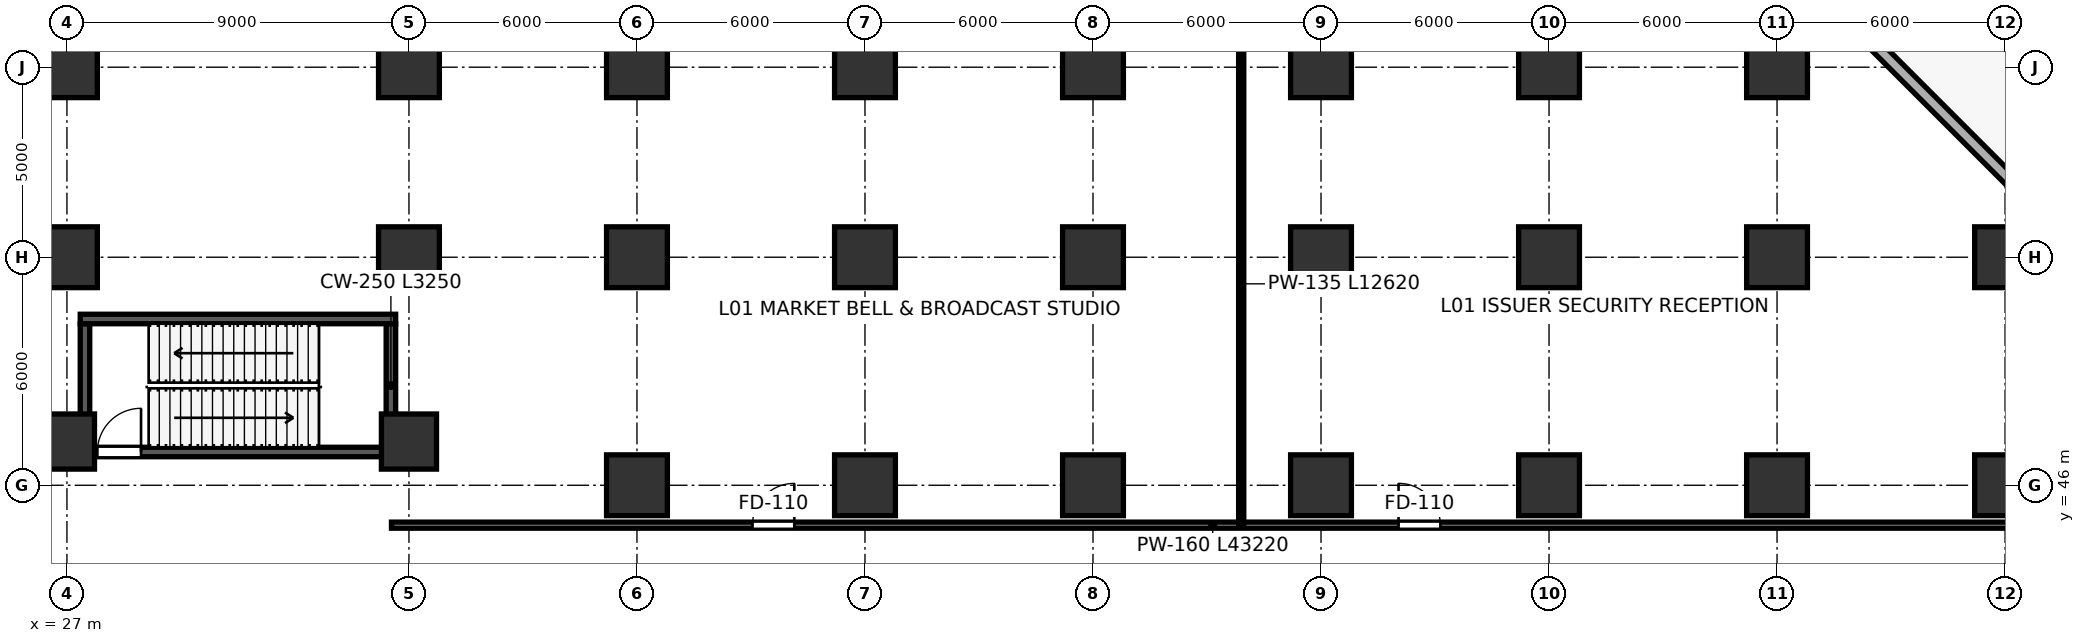
"""IFC4 building model, lengths in metres.
Left out: names, types, materials, properties, quantities, classifications, styles, units other than length and angle.
Written with IfcOpenShell. Run it as: python <this file> out.ifc"""

import sys

from ifc_helpers import new_model, si_unit, direction, frame, frame_2d, origin, origin_2d, place, context, subcontext, project, spatial, rectangle, extrude, source, transform, mapped, element, fill, save


model = new_model("IFC4")
c1 = context("Model", 3, precision=1e-05, world=origin(), true_north=direction((0.0, 1.0)))
c2 = subcontext(c1, "Body", "Model", "MODEL_VIEW")
j1 = project(units=[si_unit("LENGTHUNIT", "METRE"), si_unit("PLANEANGLEUNIT", "RADIAN")], contexts=[c1])
p1 = place(None, origin())
s1 = spatial("IfcSite", under=j1, at=p1, CompositionType="ELEMENT")
p2 = place(p1, origin())
s2 = spatial("IfcBuilding", under=s1, at=p2, CompositionType="ELEMENT")
p3 = place(p2, origin())
s3 = spatial("IfcBuildingStorey", under=s2, at=p3, CompositionType="ELEMENT", Elevation=0.0)
m1 = source(origin(), c2, "Body", "SweptSolid", [
    extrude(rectangle(XDim=1.6, YDim=1.6, at=origin_2d()), origin(), (0.0, 0.0, 1.0), 5.999),
])
p4 = place(p3, frame((27.0, 52.0, 0.001), z_axis=(0.0, 0.0, 1.0), x_axis=(1.0, 0.0, 0.0)))
e1 = element("IfcColumn", 1, at=p4, inside=s3, PredefinedType="COLUMN", context=c2, shape_type="MappedRepresentation", body=[
    mapped(m1, transform((0.0, 0.0, 0.0), scale=1.0)),
])
m2 = source(origin(), c2, "Body", "SweptSolid", [
    extrude(rectangle(XDim=1.6, YDim=1.6, at=origin_2d()), origin(), (0.0, 0.0, 1.0), 5.999),
])
p5 = place(p3, frame((27.0, 57.0, 0.001), z_axis=(0.0, 0.0, 1.0), x_axis=(1.0, 0.0, 0.0)))
e2 = element("IfcColumn", 2, at=p5, inside=s3, PredefinedType="COLUMN", context=c2, shape_type="MappedRepresentation", body=[
    mapped(m2, transform((0.0, 0.0, 0.0), scale=1.0)),
])
m3 = source(origin(), c2, "Body", "SweptSolid", [
    extrude(rectangle(XDim=1.45, YDim=1.45, at=origin_2d()), origin(), (0.0, 0.0, 1.0), 5.999),
])
p6 = place(p3, frame((27.0, 47.15, 0.001), z_axis=(0.0, 0.0, 1.0), x_axis=(1.0, 0.0, 0.0)))
e3 = element("IfcColumn", 3, at=p6, inside=s3, PredefinedType="COLUMN", context=c2, shape_type="MappedRepresentation", body=[
    mapped(m3, transform((0.0, 0.0, 0.0), scale=1.0)),
])
p7 = place(p3, frame((36.0, 52.0, 0.001), z_axis=(0.0, 0.0, 1.0), x_axis=(1.0, 0.0, 0.0)))
e4 = element("IfcColumn", 4, at=p7, inside=s3, PredefinedType="COLUMN", context=c2, shape_type="MappedRepresentation", body=[
    mapped(m1, transform((0.0, 0.0, 0.0), scale=1.0)),
])
p8 = place(p3, frame((36.0, 57.0, 0.001), z_axis=(0.0, 0.0, 1.0), x_axis=(1.0, 0.0, 0.0)))
e5 = element("IfcColumn", 5, at=p8, inside=s3, PredefinedType="COLUMN", context=c2, shape_type="MappedRepresentation", body=[
    mapped(m2, transform((0.0, 0.0, 0.0), scale=1.0)),
])
p9 = place(p3, frame((36.0, 47.15, 0.001), z_axis=(0.0, 0.0, 1.0), x_axis=(1.0, 0.0, 0.0)))
e6 = element("IfcColumn", 6, at=p9, inside=s3, PredefinedType="COLUMN", context=c2, shape_type="MappedRepresentation", body=[
    mapped(m3, transform((0.0, 0.0, 0.0), scale=1.0)),
])
for number, where, z_axis, x_axis in (
    (7, (42.0, 46.0, 0.001), (0.0, 0.0, 1.0), (1.0, 0.0, 0.0)),
    (8, (42.0, 52.0, 0.001), (0.0, 0.0, 1.0), (1.0, 0.0, 0.0)),
):
    element("IfcColumn", number, at=place(p3, frame(where, z_axis=z_axis, x_axis=x_axis)), inside=s3, PredefinedType="COLUMN", context=c2, shape_type="MappedRepresentation", body=[
        mapped(m1, transform((0.0, 0.0, 0.0), scale=1.0)),
    ])
p10 = place(p3, frame((42.0, 57.0, 0.001), z_axis=(0.0, 0.0, 1.0), x_axis=(1.0, 0.0, 0.0)))
e9 = element("IfcColumn", 9, at=p10, inside=s3, PredefinedType="COLUMN", context=c2, shape_type="MappedRepresentation", body=[
    mapped(m2, transform((0.0, 0.0, 0.0), scale=1.0)),
])
for number, where, z_axis, x_axis in (
    (10, (48.0, 46.0, 0.001), (0.0, 0.0, 1.0), (1.0, 0.0, 0.0)),
    (11, (48.0, 52.0, 0.001), (0.0, 0.0, 1.0), (1.0, 0.0, 0.0)),
):
    element("IfcColumn", number, at=place(p3, frame(where, z_axis=z_axis, x_axis=x_axis)), inside=s3, PredefinedType="COLUMN", context=c2, shape_type="MappedRepresentation", body=[
        mapped(m1, transform((0.0, 0.0, 0.0), scale=1.0)),
    ])
p11 = place(p3, frame((48.0, 57.0, 0.001), z_axis=(0.0, 0.0, 1.0), x_axis=(1.0, 0.0, 0.0)))
e12 = element("IfcColumn", 12, at=p11, inside=s3, PredefinedType="COLUMN", context=c2, shape_type="MappedRepresentation", body=[
    mapped(m2, transform((0.0, 0.0, 0.0), scale=1.0)),
])
for number, where, z_axis, x_axis in (
    (13, (54.0, 46.0, 0.001), (0.0, 0.0, 1.0), (1.0, 0.0, 0.0)),
    (14, (54.0, 52.0, 0.001), (0.0, 0.0, 1.0), (1.0, 0.0, 0.0)),
):
    element("IfcColumn", number, at=place(p3, frame(where, z_axis=z_axis, x_axis=x_axis)), inside=s3, PredefinedType="COLUMN", context=c2, shape_type="MappedRepresentation", body=[
        mapped(m1, transform((0.0, 0.0, 0.0), scale=1.0)),
    ])
p12 = place(p3, frame((54.0, 57.0, 0.001), z_axis=(0.0, 0.0, 1.0), x_axis=(1.0, 0.0, 0.0)))
e15 = element("IfcColumn", 15, at=p12, inside=s3, PredefinedType="COLUMN", context=c2, shape_type="MappedRepresentation", body=[
    mapped(m2, transform((0.0, 0.0, 0.0), scale=1.0)),
])
for number, where, z_axis, x_axis in (
    (16, (60.0, 46.0, 0.001), (0.0, 0.0, 1.0), (1.0, 0.0, 0.0)),
    (17, (60.0, 52.0, 0.001), (0.0, 0.0, 1.0), (1.0, 0.0, 0.0)),
):
    element("IfcColumn", number, at=place(p3, frame(where, z_axis=z_axis, x_axis=x_axis)), inside=s3, PredefinedType="COLUMN", context=c2, shape_type="MappedRepresentation", body=[
        mapped(m1, transform((0.0, 0.0, 0.0), scale=1.0)),
    ])
p13 = place(p3, frame((60.0, 57.0, 0.001), z_axis=(0.0, 0.0, 1.0), x_axis=(1.0, 0.0, 0.0)))
e18 = element("IfcColumn", 18, at=p13, inside=s3, PredefinedType="COLUMN", context=c2, shape_type="MappedRepresentation", body=[
    mapped(m2, transform((0.0, 0.0, 0.0), scale=1.0)),
])
for number, where, z_axis, x_axis in (
    (19, (66.0, 46.0, 0.001), (0.0, 0.0, 1.0), (1.0, 0.0, 0.0)),
    (20, (66.0, 52.0, 0.001), (0.0, 0.0, 1.0), (1.0, 0.0, 0.0)),
):
    element("IfcColumn", number, at=place(p3, frame(where, z_axis=z_axis, x_axis=x_axis)), inside=s3, PredefinedType="COLUMN", context=c2, shape_type="MappedRepresentation", body=[
        mapped(m1, transform((0.0, 0.0, 0.0), scale=1.0)),
    ])
p14 = place(p3, frame((66.0, 57.0, 0.001), z_axis=(0.0, 0.0, 1.0), x_axis=(1.0, 0.0, 0.0)))
e21 = element("IfcColumn", 21, at=p14, inside=s3, PredefinedType="COLUMN", context=c2, shape_type="MappedRepresentation", body=[
    mapped(m2, transform((0.0, 0.0, 0.0), scale=1.0)),
])
for number, where, z_axis, x_axis in (
    (22, (72.0, 46.0, 0.001), (0.0, 0.0, 1.0), (1.0, 0.0, 0.0)),
    (23, (72.0, 52.0, 0.001), (0.0, 0.0, 1.0), (1.0, 0.0, 0.0)),
):
    element("IfcColumn", number, at=place(p3, frame(where, z_axis=z_axis, x_axis=x_axis)), inside=s3, PredefinedType="COLUMN", context=c2, shape_type="MappedRepresentation", body=[
        mapped(m1, transform((0.0, 0.0, 0.0), scale=1.0)),
    ])
for number, where, z_axis, x_axis in (
    (24, (72.0, 57.0, 0.001), (0.0, 0.0, 1.0), (1.0, 0.0, 0.0)),
    (25, (78.0, 46.0, 0.001), (0.0, 0.0, 1.0), (1.0, 0.0, 0.0)),
    (26, (78.0, 52.0, 0.001), (0.0, 0.0, 1.0), (1.0, 0.0, 0.0)),
):
    element("IfcColumn", number, at=place(p3, frame(where, z_axis=z_axis, x_axis=x_axis)), inside=s3, PredefinedType="COLUMN", context=c2, shape_type="MappedRepresentation", body=[
        mapped(m2, transform((0.0, 0.0, 0.0), scale=1.0)),
    ])
p15 = place(p3, frame((78.829, 53.329, 0.0), z_axis=(0.0, 0.0, 1.0), x_axis=(-0.707106781187, 0.707106781187, 0.0)))
e27 = element("IfcWall", 27, at=p15, inside=s3, PredefinedType="SOLIDWALL", context=c2, shape_type="SweptSolid", body=[
    extrude(rectangle(XDim=6.364, YDim=0.32, at=frame_2d((3.182, 0.0))), origin(), (0.0, 0.0, 1.0), 5.74),
])
for number, where, z_axis, x_axis in (
    (28, (27.475, 47.0, 0.0), (0.0, 0.0, 1.0), (0.0, 1.0, 0.0)),
    (29, (35.525, 47.0, 0.0), (0.0, 0.0, 1.0), (0.0, 1.0, 0.0)),
):
    element("IfcWall", number, at=place(p3, frame(where, z_axis=z_axis, x_axis=x_axis)), inside=s3, PredefinedType="SHEAR", context=c2, shape_type="SweptSolid", body=[
        extrude(rectangle(XDim=3.25, YDim=0.25, at=frame_2d((1.625, 0.0))), origin(), (0.0, 0.0, 1.0), 5.74),
    ])
p16 = place(p3, frame((27.35, 46.875, 0.0), z_axis=(0.0, 0.0, 1.0), x_axis=(1.0, 0.0, 0.0)))
e30 = element("IfcWall", 30, at=p16, inside=s3, PredefinedType="SHEAR", context=c2, shape_type="SweptSolid", body=[
    extrude(rectangle(XDim=8.3, YDim=0.25, at=frame_2d((4.15, 0.0))), origin(), (0.0, 0.0, 1.0), 5.74),
])
p17 = place(p16, frame((0.45, 0.0, 0.0)))
e31 = element("IfcOpeningElement", 31, at=p17, cuts=e30, PredefinedType="OPENING", context=c2, shape_type="SweptSolid", body=[
    extrude(rectangle(XDim=1.15, YDim=2.2, at=frame_2d((0.575, 1.1))), frame((0.0, 0.135, 0.0), z_axis=(0.0, -1.0, 0.0), x_axis=(1.0, 0.0, 0.0)), (0.0, 0.0, 1.0), 0.27),
])
p18 = place(p3, frame((27.35, 50.375, 0.0), z_axis=(0.0, 0.0, 1.0), x_axis=(1.0, 0.0, 0.0)))
e32 = element("IfcWall", 32, at=p18, inside=s3, PredefinedType="SHEAR", context=c2, shape_type="SweptSolid", body=[
    extrude(rectangle(XDim=8.3, YDim=0.25, at=frame_2d((4.15, 0.0))), origin(), (0.0, 0.0, 1.0), 5.74),
])
p19 = place(p3, frame((35.54, 44.95, 0.0), z_axis=(0.0, 0.0, 1.0), x_axis=(1.0, 0.0, 0.0)))
e33 = element("IfcWall", 33, at=p19, inside=s3, PredefinedType="PARTITIONING", context=c2, shape_type="SweptSolid", body=[
    extrude(rectangle(XDim=43.22, YDim=0.16, at=frame_2d((21.61, 0.0))), origin(), (0.0, 0.0, 1.0), 4.875),
])
p20 = place(p19, frame((9.5, 0.0, 0.0)))
e34 = element("IfcOpeningElement", 34, at=p20, cuts=e33, PredefinedType="OPENING", context=c2, shape_type="SweptSolid", body=[
    extrude(rectangle(XDim=1.1, YDim=2.2, at=frame_2d((0.55, 1.1))), frame((0.0, 0.09, 0.0), z_axis=(0.0, -1.0, 0.0), x_axis=(1.0, 0.0, 0.0)), (0.0, 0.0, 1.0), 0.18),
])
p21 = place(p19, frame((26.5, 0.0, 0.0)))
e35 = element("IfcOpeningElement", 35, at=p21, cuts=e33, PredefinedType="OPENING", context=c2, shape_type="SweptSolid", body=[
    extrude(rectangle(XDim=1.1, YDim=2.2, at=frame_2d((0.55, 1.1))), frame((0.0, 0.09, 0.0), z_axis=(0.0, -1.0, 0.0), x_axis=(1.0, 0.0, 0.0)), (0.0, 0.0, 1.0), 0.18),
])
p22 = place(p3, frame((57.9, 44.99, 0.0), z_axis=(0.0, 0.0, 1.0), x_axis=(0.0, 1.0, 0.0)))
e36 = element("IfcWall", 36, at=p22, inside=s3, PredefinedType="PARTITIONING", context=c2, shape_type="SweptSolid", body=[
    extrude(rectangle(XDim=12.62, YDim=0.135, at=frame_2d((6.31, 0.0))), origin(), (0.0, 0.0, 1.0), 4.875),
])
m4 = source(origin(), c2, "Body", "SweptSolid", [
    extrude(rectangle(XDim=1.15, YDim=2.2, at=frame_2d((0.575, 1.1))), frame((0.0, 0.025, 0.0), z_axis=(0.0, -1.0, 0.0), x_axis=(1.0, 0.0, 0.0)), (0.0, 0.0, 1.0), 0.05),
])
p23 = place(p17, origin())
e37 = element("IfcDoor", 37, at=p23, inside=s3, OperationType="SINGLE_SWING_RIGHT", PredefinedType="DOOR", context=c2, shape_type="MappedRepresentation", body=[
    mapped(m4, transform((0.0, 0.0, 0.0), scale=1.0)),
])
fill(e31, e37)
m5 = source(origin(), c2, "Body", "SweptSolid", [
    extrude(rectangle(XDim=1.1, YDim=2.2, at=frame_2d((0.55, 1.1))), frame((0.0, 0.025, 0.0), z_axis=(0.0, -1.0, 0.0), x_axis=(1.0, 0.0, 0.0)), (0.0, 0.0, 1.0), 0.05),
])
p24 = place(p20, origin())
e38 = element("IfcDoor", 38, at=p24, inside=s3, OperationType="SINGLE_SWING_RIGHT", PredefinedType="DOOR", context=c2, shape_type="MappedRepresentation", body=[
    mapped(m5, transform((0.0, 0.0, 0.0), scale=1.0)),
])
fill(e34, e38)
p25 = place(p21, origin())
e39 = element("IfcDoor", 39, at=p25, inside=s3, OperationType="SINGLE_SWING_LEFT", PredefinedType="DOOR", context=c2, shape_type="MappedRepresentation", body=[
    mapped(m5, transform((0.0, 0.0, 0.0), scale=1.0)),
])
fill(e35, e39)
save(model, sys.argv[1])
